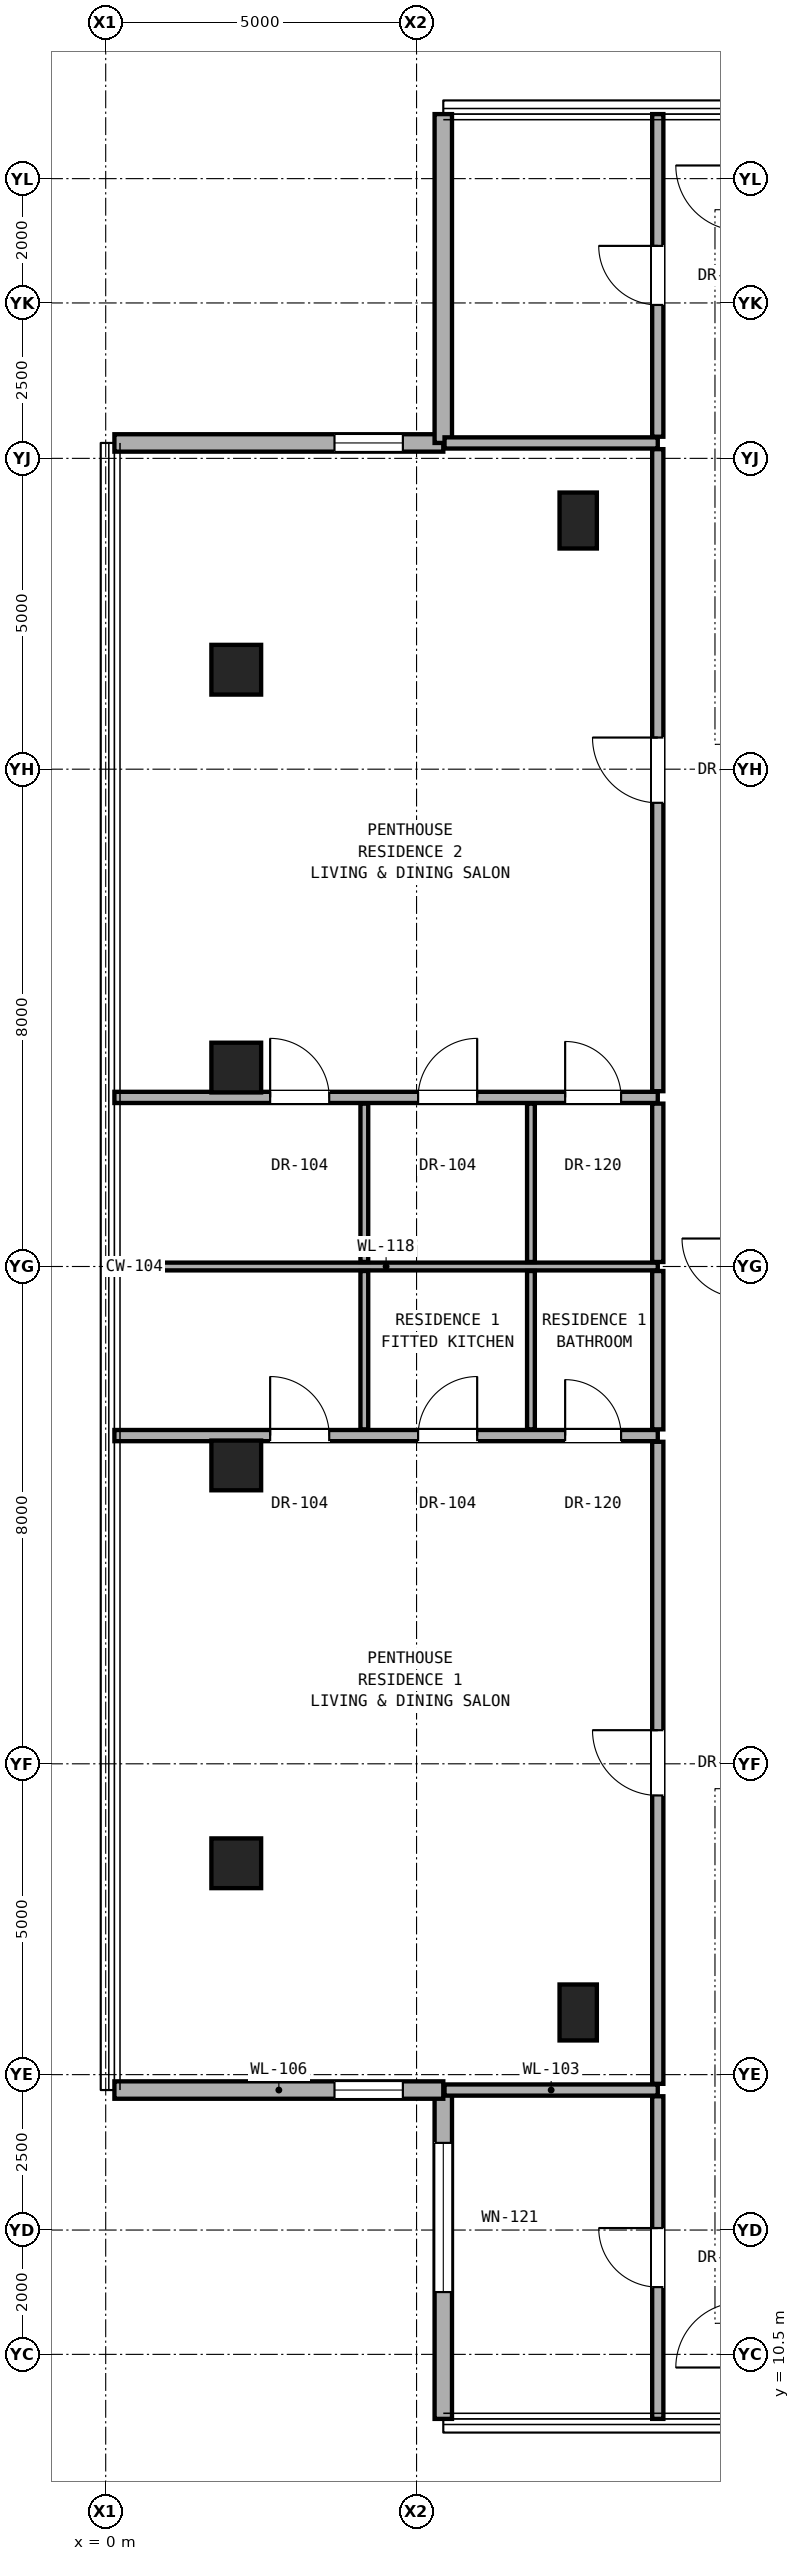
"""IFC4 building model, lengths in metres.
Left out: names, types, materials, properties, quantities, classifications, styles, units other than length and angle.
Written with IfcOpenShell. Run it as: python <this file> out.ifc"""

import sys

from ifc_helpers import new_model, si_unit, direction, frame, frame_2d, origin, origin_2d, place, context, subcontext, project, spatial, rectangle, hollow_rectangle, extrude, element, fill, save


model = new_model("IFC4")
c1 = context("Model", 3, precision=1e-05, world=origin(), true_north=direction((0.0, 1.0)))
c2 = subcontext(c1, "Body", "Model", "MODEL_VIEW")
j1 = project(units=[si_unit("LENGTHUNIT", "METRE"), si_unit("PLANEANGLEUNIT", "RADIAN")], contexts=[c1])
p1 = place(None, origin())
s1 = spatial("IfcSite", under=j1, at=p1, CompositionType="ELEMENT")
p2 = place(p1, origin())
s2 = spatial("IfcBuilding", under=s1, at=p2, CompositionType="ELEMENT")
p3 = place(p2, frame((0.0, 0.0, 222.7)))
s3 = spatial("IfcBuildingStorey", under=s2, at=p3, CompositionType="ELEMENT", Elevation=222.7)
for number, where, z_axis, x_axis in (
    (1, (2.1, 18.4, 0.0), (0.0, 0.0, 1.0), (1.0, 0.0, 0.0)),
    (2, (2.1, 24.8, 0.0), (0.0, 0.0, 1.0), (1.0, 0.0, 0.0)),
    (3, (2.1, 31.2, 0.0), (0.0, 0.0, 1.0), (1.0, 0.0, 0.0)),
    (4, (2.1, 37.6, 0.0), (0.0, 0.0, 1.0), (1.0, 0.0, 0.0)),
):
    element("IfcColumn", number, at=place(p3, frame(where, z_axis=z_axis, x_axis=x_axis)), inside=s3, PredefinedType="COLUMN", context=c2, shape_type="SweptSolid", body=[
        extrude(hollow_rectangle(XDim=0.8, YDim=0.8, WallThickness=0.045, at=origin_2d()), origin(), (0.0, 0.0, 1.0), 3.3),
    ])
for number, where, z_axis, x_axis in (
    (5, (7.6, 16.0, 0.0), (0.0, 0.0, 1.0), (1.0, 0.0, 0.0)),
    (6, (7.6, 40.0, 0.0), (0.0, 0.0, 1.0), (1.0, 0.0, 0.0)),
):
    element("IfcColumn", number, at=place(p3, frame(where, z_axis=z_axis, x_axis=x_axis)), inside=s3, PredefinedType="PILASTER", context=c2, shape_type="SweptSolid", body=[
        extrude(rectangle(XDim=0.6, YDim=0.9, at=origin_2d()), origin(), (0.0, 0.0, 1.0), 3.3),
    ])
p4 = place(p3, frame((5.43, 14.752, 0.0), z_axis=(0.0, 0.0, 1.0), x_axis=(0.0, -1.0, 0.0)))
e7 = element("IfcWall", 7, at=p4, inside=s3, PredefinedType="SOLIDWALL", context=c2, shape_type="SweptSolid", body=[
    extrude(rectangle(XDim=5.29, YDim=0.28, at=frame_2d((2.645, 0.0))), origin(), (0.0, 0.0, 1.0), 3.08),
])
p5 = place(p4, frame((0.85, 0.0, 0.58)))
e8 = element("IfcOpeningElement", 8, at=p5, cuts=e7, PredefinedType="OPENING", context=c2, shape_type="SweptSolid", body=[
    extrude(rectangle(XDim=2.4, YDim=2.35, at=frame_2d((1.2, 1.175))), frame((0.0, 0.15, 0.0), z_axis=(0.0, -1.0, 0.0), x_axis=(1.0, 0.0, 0.0)), (0.0, 0.0, 1.0), 0.3),
])
p6 = place(p3, frame((0.14, 14.752, 0.0), z_axis=(0.0, 0.0, 1.0), x_axis=(1.0, 0.0, 0.0)))
e9 = element("IfcWall", 9, at=p6, inside=s3, PredefinedType="SOLIDWALL", context=c2, shape_type="SweptSolid", body=[
    extrude(rectangle(XDim=5.29, YDim=0.28, at=frame_2d((2.645, 0.0))), origin(), (0.0, 0.0, 1.0), 3.08),
])
p7 = place(p6, frame((3.54, 0.0, 0.85)))
e10 = element("IfcOpeningElement", 10, at=p7, cuts=e9, PredefinedType="OPENING", context=c2, shape_type="SweptSolid", body=[
    extrude(rectangle(XDim=1.1, YDim=2.0, at=frame_2d((0.55, 1.0))), frame((0.0, 0.15, 0.0), z_axis=(0.0, -1.0, 0.0), x_axis=(1.0, 0.0, 0.0)), (0.0, 0.0, 1.0), 0.3),
])
p8 = place(p3, frame((5.43, 41.248, 0.0), z_axis=(0.0, 0.0, 1.0), x_axis=(-1.0, 0.0, 0.0)))
e11 = element("IfcWall", 11, at=p8, inside=s3, PredefinedType="SOLIDWALL", context=c2, shape_type="SweptSolid", body=[
    extrude(rectangle(XDim=5.29, YDim=0.28, at=frame_2d((2.645, 0.0))), origin(), (0.0, 0.0, 1.0), 3.08),
])
p9 = place(p8, frame((0.65, 0.0, 0.85)))
e12 = element("IfcOpeningElement", 12, at=p9, cuts=e11, PredefinedType="OPENING", context=c2, shape_type="SweptSolid", body=[
    extrude(rectangle(XDim=1.1, YDim=2.0, at=frame_2d((0.55, 1.0))), frame((0.0, 0.15, 0.0), z_axis=(0.0, -1.0, 0.0), x_axis=(1.0, 0.0, 0.0)), (0.0, 0.0, 1.0), 0.3),
])
p10 = place(p3, frame((5.43, 46.538, 0.0), z_axis=(0.0, 0.0, 1.0), x_axis=(0.0, -1.0, 0.0)))
e13 = element("IfcWall", 13, at=p10, inside=s3, PredefinedType="SOLIDWALL", context=c2, shape_type="SweptSolid", body=[
    extrude(rectangle(XDim=5.29, YDim=0.28, at=frame_2d((2.645, 0.0))), origin(), (0.0, 0.0, 1.0), 3.08),
])
p11 = place(p3, frame((5.45, 14.752, 0.0), z_axis=(0.0, 0.0, 1.0), x_axis=(1.0, 0.0, 0.0)))
e14 = element("IfcWall", 14, at=p11, inside=s3, PredefinedType="PARTITIONING", context=c2, shape_type="SweptSolid", body=[
    extrude(rectangle(XDim=3.43, YDim=0.18, at=frame_2d((1.715, 0.0))), origin(), (0.0, 0.0, 1.0), 3.1),
])
p12 = place(p3, frame((0.14, 25.28, 0.0), z_axis=(0.0, 0.0, 1.0), x_axis=(1.0, 0.0, 0.0)))
e15 = element("IfcWall", 15, at=p12, inside=s3, PredefinedType="PARTITIONING", context=c2, shape_type="SweptSolid", body=[
    extrude(rectangle(XDim=8.74, YDim=0.18, at=frame_2d((4.37, 0.0))), origin(), (0.0, 0.0, 1.0), 2.319),
])
p13 = place(p12, frame((2.505, 0.0, 0.0)))
e16 = element("IfcOpeningElement", 16, at=p13, cuts=e15, PredefinedType="OPENING", context=c2, shape_type="SweptSolid", body=[
    extrude(rectangle(XDim=0.95, YDim=2.15, at=frame_2d((0.475, 1.075))), frame((0.0, 0.1, 0.0), z_axis=(0.0, -1.0, 0.0), x_axis=(1.0, 0.0, 0.0)), (0.0, 0.0, 1.0), 0.2),
])
p14 = place(p12, frame((4.885, 0.0, 0.0)))
e17 = element("IfcOpeningElement", 17, at=p14, cuts=e15, PredefinedType="OPENING", context=c2, shape_type="SweptSolid", body=[
    extrude(rectangle(XDim=0.95, YDim=2.15, at=frame_2d((0.475, 1.075))), frame((0.0, 0.1, 0.0), z_axis=(0.0, -1.0, 0.0), x_axis=(1.0, 0.0, 0.0)), (0.0, 0.0, 1.0), 0.2),
])
p15 = place(p12, frame((7.25, 0.0, 0.0)))
e18 = element("IfcOpeningElement", 18, at=p15, cuts=e15, PredefinedType="OPENING", context=c2, shape_type="SweptSolid", body=[
    extrude(rectangle(XDim=0.9, YDim=2.1, at=frame_2d((0.45, 1.05))), frame((0.0, 0.1, 0.0), z_axis=(0.0, -1.0, 0.0), x_axis=(1.0, 0.0, 0.0)), (0.0, 0.0, 1.0), 0.2),
])
p16 = place(p3, frame((0.14, 28.0, 0.0), z_axis=(0.0, 0.0, 1.0), x_axis=(1.0, 0.0, 0.0)))
e19 = element("IfcWall", 19, at=p16, inside=s3, PredefinedType="PARTITIONING", context=c2, shape_type="SweptSolid", body=[
    extrude(rectangle(XDim=8.74, YDim=0.125, at=frame_2d((4.37, 0.0))), origin(), (0.0, 0.0, 1.0), 2.319),
])
p17 = place(p3, frame((0.14, 30.72, 0.0), z_axis=(0.0, 0.0, 1.0), x_axis=(1.0, 0.0, 0.0)))
e20 = element("IfcWall", 20, at=p17, inside=s3, PredefinedType="PARTITIONING", context=c2, shape_type="SweptSolid", body=[
    extrude(rectangle(XDim=8.74, YDim=0.18, at=frame_2d((4.37, 0.0))), origin(), (0.0, 0.0, 1.0), 2.319),
])
p18 = place(p17, frame((2.505, 0.0, 0.0)))
e21 = element("IfcOpeningElement", 21, at=p18, cuts=e20, PredefinedType="OPENING", context=c2, shape_type="SweptSolid", body=[
    extrude(rectangle(XDim=0.95, YDim=2.15, at=frame_2d((0.475, 1.075))), frame((0.0, 0.1, 0.0), z_axis=(0.0, -1.0, 0.0), x_axis=(1.0, 0.0, 0.0)), (0.0, 0.0, 1.0), 0.2),
])
p19 = place(p17, frame((4.885, 0.0, 0.0)))
e22 = element("IfcOpeningElement", 22, at=p19, cuts=e20, PredefinedType="OPENING", context=c2, shape_type="SweptSolid", body=[
    extrude(rectangle(XDim=0.95, YDim=2.15, at=frame_2d((0.475, 1.075))), frame((0.0, 0.1, 0.0), z_axis=(0.0, -1.0, 0.0), x_axis=(1.0, 0.0, 0.0)), (0.0, 0.0, 1.0), 0.2),
])
p20 = place(p17, frame((7.25, 0.0, 0.0)))
e23 = element("IfcOpeningElement", 23, at=p20, cuts=e20, PredefinedType="OPENING", context=c2, shape_type="SweptSolid", body=[
    extrude(rectangle(XDim=0.9, YDim=2.1, at=frame_2d((0.45, 1.05))), frame((0.0, 0.1, 0.0), z_axis=(0.0, -1.0, 0.0), x_axis=(1.0, 0.0, 0.0)), (0.0, 0.0, 1.0), 0.2),
])
p21 = place(p3, frame((5.45, 41.248, 0.0), z_axis=(0.0, 0.0, 1.0), x_axis=(1.0, 0.0, 0.0)))
e24 = element("IfcWall", 24, at=p21, inside=s3, PredefinedType="PARTITIONING", context=c2, shape_type="SweptSolid", body=[
    extrude(rectangle(XDim=3.43, YDim=0.18, at=frame_2d((1.715, 0.0))), origin(), (0.0, 0.0, 1.0), 3.1),
])
for number, where, z_axis, x_axis in (
    (25, (4.16, 25.38, 0.0), (0.0, 0.0, 1.0), (0.0, 1.0, 0.0)),
    (26, (4.16, 28.073, 0.0), (0.0, 0.0, 1.0), (0.0, 1.0, 0.0)),
    (27, (6.84, 25.38, 0.0), (0.0, 0.0, 1.0), (0.0, 1.0, 0.0)),
    (28, (6.84, 28.073, 0.0), (0.0, 0.0, 1.0), (0.0, 1.0, 0.0)),
):
    element("IfcWall", number, at=place(p3, frame(where, z_axis=z_axis, x_axis=x_axis)), inside=s3, PredefinedType="PARTITIONING", context=c2, shape_type="SweptSolid", body=[
        extrude(rectangle(XDim=2.548, YDim=0.125, at=frame_2d((1.274, 0.0))), origin(), (0.0, 0.0, 1.0), 3.1),
    ])
p22 = place(p3, frame((8.88, 9.462, 0.0), z_axis=(0.0, 0.0, 1.0), x_axis=(0.0, 1.0, 0.0)))
e29 = element("IfcWall", 29, at=p22, inside=s3, PredefinedType="PARTITIONING", context=c2, shape_type="SweptSolid", body=[
    extrude(rectangle(XDim=5.19, YDim=0.18, at=frame_2d((2.595, 0.0))), origin(), (0.0, 0.0, 1.0), 3.1),
])
p23 = place(p22, frame((2.12, 0.0, 0.0)))
e30 = element("IfcOpeningElement", 30, at=p23, cuts=e29, PredefinedType="OPENING", context=c2, shape_type="SweptSolid", body=[
    extrude(rectangle(XDim=0.95, YDim=2.15, at=frame_2d((0.475, 1.075))), frame((0.0, 0.1, 0.0), z_axis=(0.0, -1.0, 0.0), x_axis=(1.0, 0.0, 0.0)), (0.0, 0.0, 1.0), 0.2),
])
p24 = place(p3, frame((8.88, 14.852, 0.0), z_axis=(0.0, 0.0, 1.0), x_axis=(0.0, 1.0, 0.0)))
e31 = element("IfcWall", 31, at=p24, inside=s3, PredefinedType="PARTITIONING", context=c2, shape_type="SweptSolid", body=[
    extrude(rectangle(XDim=10.328, YDim=0.18, at=frame_2d((5.164, 0.0))), origin(), (0.0, 0.0, 1.0), 2.396),
])
p25 = place(p24, frame((4.639, 0.0, 0.0)))
e32 = element("IfcOpeningElement", 32, at=p25, cuts=e31, PredefinedType="OPENING", context=c2, shape_type="SweptSolid", body=[
    extrude(rectangle(XDim=1.05, YDim=2.2, at=frame_2d((0.525, 1.1))), frame((0.0, 0.1, 0.0), z_axis=(0.0, -1.0, 0.0), x_axis=(1.0, 0.0, 0.0)), (0.0, 0.0, 1.0), 0.2),
])
for number, where, z_axis, x_axis in (
    (33, (8.88, 25.38, 0.0), (0.0, 0.0, 1.0), (0.0, 1.0, 0.0)),
    (34, (8.88, 28.073, 0.0), (0.0, 0.0, 1.0), (0.0, 1.0, 0.0)),
):
    element("IfcWall", number, at=place(p3, frame(where, z_axis=z_axis, x_axis=x_axis)), inside=s3, PredefinedType="PARTITIONING", context=c2, shape_type="SweptSolid", body=[
        extrude(rectangle(XDim=2.548, YDim=0.18, at=frame_2d((1.274, 0.0))), origin(), (0.0, 0.0, 1.0), 3.1),
    ])
p26 = place(p3, frame((8.88, 30.82, 0.0), z_axis=(0.0, 0.0, 1.0), x_axis=(0.0, 1.0, 0.0)))
e35 = element("IfcWall", 35, at=p26, inside=s3, PredefinedType="PARTITIONING", context=c2, shape_type="SweptSolid", body=[
    extrude(rectangle(XDim=10.328, YDim=0.18, at=frame_2d((5.164, 0.0))), origin(), (0.0, 0.0, 1.0), 2.396),
])
p27 = place(p26, frame((4.639, 0.0, 0.0)))
e36 = element("IfcOpeningElement", 36, at=p27, cuts=e35, PredefinedType="OPENING", context=c2, shape_type="SweptSolid", body=[
    extrude(rectangle(XDim=1.05, YDim=2.2, at=frame_2d((0.525, 1.1))), frame((0.0, 0.1, 0.0), z_axis=(0.0, -1.0, 0.0), x_axis=(1.0, 0.0, 0.0)), (0.0, 0.0, 1.0), 0.2),
])
p28 = place(p3, frame((8.88, 41.348, 0.0), z_axis=(0.0, 0.0, 1.0), x_axis=(0.0, 1.0, 0.0)))
e37 = element("IfcWall", 37, at=p28, inside=s3, PredefinedType="PARTITIONING", context=c2, shape_type="SweptSolid", body=[
    extrude(rectangle(XDim=5.19, YDim=0.18, at=frame_2d((2.595, 0.0))), origin(), (0.0, 0.0, 1.0), 3.1),
])
p29 = place(p28, frame((2.12, 0.0, 0.0)))
e38 = element("IfcOpeningElement", 38, at=p29, cuts=e37, PredefinedType="OPENING", context=c2, shape_type="SweptSolid", body=[
    extrude(rectangle(XDim=0.95, YDim=2.15, at=frame_2d((0.475, 1.075))), frame((0.0, 0.1, 0.0), z_axis=(0.0, -1.0, 0.0), x_axis=(1.0, 0.0, 0.0)), (0.0, 0.0, 1.0), 0.2),
])
p30 = place(p5, origin())
e39 = element("IfcWindow", 39, at=p30, inside=s3, PartitioningType="SINGLE_PANEL", PredefinedType="WINDOW", context=c2, shape_type="SweptSolid", body=[
    extrude(rectangle(XDim=2.4, YDim=2.35, at=frame_2d((1.2, 1.175))), frame((0.0, 0.03, 0.0), z_axis=(0.0, -1.0, 0.0), x_axis=(1.0, 0.0, 0.0)), (0.0, 0.0, 1.0), 0.06),
])
fill(e8, e39)
p31 = place(p7, origin())
e40 = element("IfcWindow", 40, at=p31, inside=s3, PartitioningType="SINGLE_PANEL", PredefinedType="WINDOW", context=c2, shape_type="SweptSolid", body=[
    extrude(rectangle(XDim=1.1, YDim=2.0, at=frame_2d((0.55, 1.0))), frame((0.0, 0.03, 0.0), z_axis=(0.0, -1.0, 0.0), x_axis=(1.0, 0.0, 0.0)), (0.0, 0.0, 1.0), 0.06),
])
fill(e10, e40)
p32 = place(p9, origin())
e41 = element("IfcWindow", 41, at=p32, inside=s3, PartitioningType="SINGLE_PANEL", PredefinedType="WINDOW", context=c2, shape_type="SweptSolid", body=[
    extrude(rectangle(XDim=1.1, YDim=2.0, at=frame_2d((0.55, 1.0))), frame((0.0, 0.03, 0.0), z_axis=(0.0, -1.0, 0.0), x_axis=(1.0, 0.0, 0.0)), (0.0, 0.0, 1.0), 0.06),
])
fill(e12, e41)
p33 = place(p25, origin())
e42 = element("IfcDoor", 42, at=p33, inside=s3, OperationType="SINGLE_SWING_RIGHT", PredefinedType="DOOR", context=c2, shape_type="SweptSolid", body=[
    extrude(rectangle(XDim=1.05, YDim=2.2, at=frame_2d((0.525, 1.1))), frame((0.0, 0.025, 0.0), z_axis=(0.0, -1.0, 0.0), x_axis=(1.0, 0.0, 0.0)), (0.0, 0.0, 1.0), 0.05),
])
fill(e32, e42)
p34 = place(p13, origin())
e43 = element("IfcDoor", 43, at=p34, inside=s3, OperationType="SINGLE_SWING_LEFT", PredefinedType="DOOR", context=c2, shape_type="SweptSolid", body=[
    extrude(rectangle(XDim=0.95, YDim=2.15, at=frame_2d((0.475, 1.075))), frame((0.0, 0.025, 0.0), z_axis=(0.0, -1.0, 0.0), x_axis=(1.0, 0.0, 0.0)), (0.0, 0.0, 1.0), 0.05),
])
fill(e16, e43)
p35 = place(p14, origin())
e44 = element("IfcDoor", 44, at=p35, inside=s3, OperationType="SINGLE_SWING_RIGHT", PredefinedType="DOOR", context=c2, shape_type="SweptSolid", body=[
    extrude(rectangle(XDim=0.95, YDim=2.15, at=frame_2d((0.475, 1.075))), frame((0.0, 0.025, 0.0), z_axis=(0.0, -1.0, 0.0), x_axis=(1.0, 0.0, 0.0)), (0.0, 0.0, 1.0), 0.05),
])
fill(e17, e44)
p36 = place(p15, origin())
e45 = element("IfcDoor", 45, at=p36, inside=s3, OperationType="SINGLE_SWING_LEFT", PredefinedType="DOOR", context=c2, shape_type="SweptSolid", body=[
    extrude(rectangle(XDim=0.9, YDim=2.1, at=frame_2d((0.45, 1.05))), frame((0.0, 0.025, 0.0), z_axis=(0.0, -1.0, 0.0), x_axis=(1.0, 0.0, 0.0)), (0.0, 0.0, 1.0), 0.05),
])
fill(e18, e45)
p37 = place(p27, origin())
e46 = element("IfcDoor", 46, at=p37, inside=s3, OperationType="SINGLE_SWING_RIGHT", PredefinedType="DOOR", context=c2, shape_type="SweptSolid", body=[
    extrude(rectangle(XDim=1.05, YDim=2.2, at=frame_2d((0.525, 1.1))), frame((0.0, 0.025, 0.0), z_axis=(0.0, -1.0, 0.0), x_axis=(1.0, 0.0, 0.0)), (0.0, 0.0, 1.0), 0.05),
])
fill(e36, e46)
p38 = place(p18, origin())
e47 = element("IfcDoor", 47, at=p38, inside=s3, OperationType="SINGLE_SWING_LEFT", PredefinedType="DOOR", context=c2, shape_type="SweptSolid", body=[
    extrude(rectangle(XDim=0.95, YDim=2.15, at=frame_2d((0.475, 1.075))), frame((0.0, 0.025, 0.0), z_axis=(0.0, -1.0, 0.0), x_axis=(1.0, 0.0, 0.0)), (0.0, 0.0, 1.0), 0.05),
])
fill(e21, e47)
p39 = place(p19, origin())
e48 = element("IfcDoor", 48, at=p39, inside=s3, OperationType="SINGLE_SWING_RIGHT", PredefinedType="DOOR", context=c2, shape_type="SweptSolid", body=[
    extrude(rectangle(XDim=0.95, YDim=2.15, at=frame_2d((0.475, 1.075))), frame((0.0, 0.025, 0.0), z_axis=(0.0, -1.0, 0.0), x_axis=(1.0, 0.0, 0.0)), (0.0, 0.0, 1.0), 0.05),
])
fill(e22, e48)
p40 = place(p20, origin())
e49 = element("IfcDoor", 49, at=p40, inside=s3, OperationType="SINGLE_SWING_LEFT", PredefinedType="DOOR", context=c2, shape_type="SweptSolid", body=[
    extrude(rectangle(XDim=0.9, YDim=2.1, at=frame_2d((0.45, 1.05))), frame((0.0, 0.025, 0.0), z_axis=(0.0, -1.0, 0.0), x_axis=(1.0, 0.0, 0.0)), (0.0, 0.0, 1.0), 0.05),
])
fill(e23, e49)
p41 = place(p23, origin())
e50 = element("IfcDoor", 50, at=p41, inside=s3, OperationType="SINGLE_SWING_RIGHT", PredefinedType="DOOR", context=c2, shape_type="SweptSolid", body=[
    extrude(rectangle(XDim=0.95, YDim=2.15, at=frame_2d((0.475, 1.075))), frame((0.0, 0.025, 0.0), z_axis=(0.0, -1.0, 0.0), x_axis=(1.0, 0.0, 0.0)), (0.0, 0.0, 1.0), 0.05),
])
fill(e30, e50)
p42 = place(p29, origin())
e51 = element("IfcDoor", 51, at=p42, inside=s3, OperationType="SINGLE_SWING_RIGHT", PredefinedType="DOOR", context=c2, shape_type="SweptSolid", body=[
    extrude(rectangle(XDim=0.95, YDim=2.15, at=frame_2d((0.475, 1.075))), frame((0.0, 0.025, 0.0), z_axis=(0.0, -1.0, 0.0), x_axis=(1.0, 0.0, 0.0)), (0.0, 0.0, 1.0), 0.05),
])
fill(e38, e51)
save(model, sys.argv[1])
